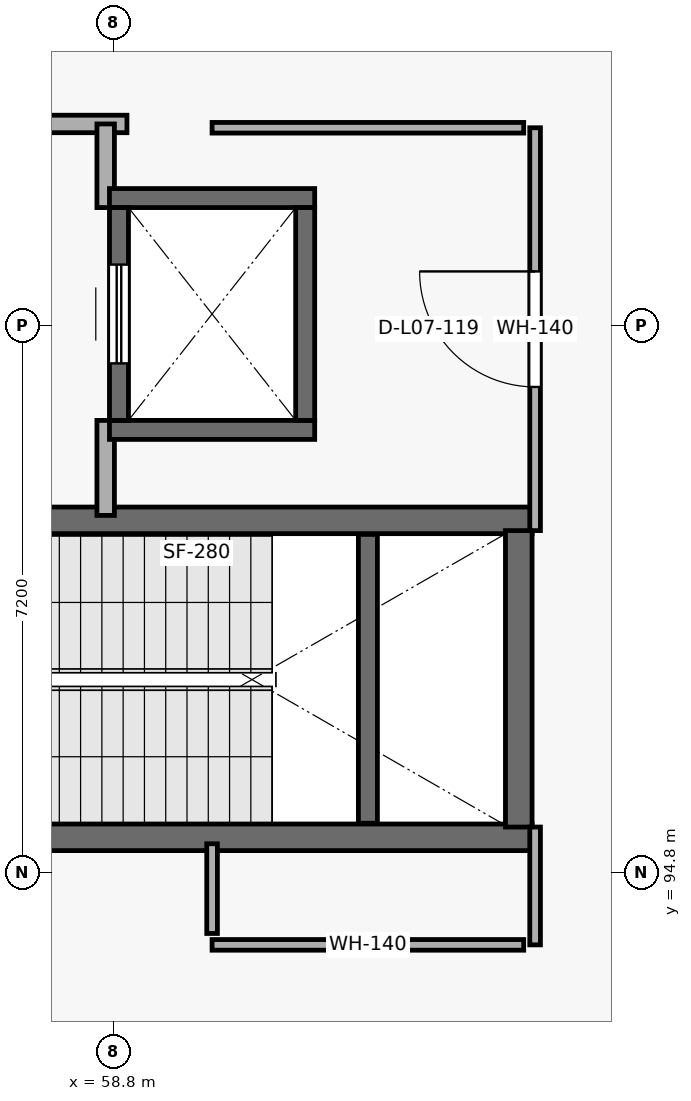
"""IFC4 building model, lengths in metres.
Left out: names, types, materials, properties, quantities, classifications, styles, units other than length and angle.
Written with IfcOpenShell. Run it as: python <this file> out.ifc"""

import sys

from ifc_helpers import new_model, si_unit, direction, frame, frame_2d, origin, place, context, subcontext, project, spatial, rectangle, extrude, element, fill, save


model = new_model("IFC4")
c1 = context("Model", 3, precision=1e-05, world=origin(), true_north=direction((0.0, 1.0)))
c2 = subcontext(c1, "Body", "Model", "MODEL_VIEW")
j1 = project(units=[si_unit("LENGTHUNIT", "METRE"), si_unit("PLANEANGLEUNIT", "RADIAN")], contexts=[c1])
p1 = place(None, origin())
s1 = spatial("IfcSite", under=j1, at=p1, CompositionType="ELEMENT")
p2 = place(p1, origin())
s2 = spatial("IfcBuilding", under=s1, at=p2, CompositionType="ELEMENT")
p3 = place(p2, frame((0.0, 0.0, 30.6)))
s3 = spatial("IfcBuildingStorey", under=s2, at=p3, CompositionType="ELEMENT", Elevation=30.6)
p4 = place(p3, frame((55.09, 95.265, 0.0), z_axis=(0.0, 0.0, 1.0), x_axis=(1.0, 0.0, 0.0)))
e1 = element("IfcWall", 1, at=p4, inside=s3, PredefinedType="SHEAR", context=c2, shape_type="SweptSolid", body=[
    extrude(rectangle(XDim=9.22, YDim=0.35, at=frame_2d((4.61, 0.0))), origin(), (0.0, 0.0, 1.0), 4.84),
])
p5 = place(p4, frame((0.45, 0.0, 0.0)))
e2 = element("IfcOpeningElement", 2, at=p5, cuts=e1, PredefinedType="OPENING", context=c2, shape_type="SweptSolid", body=[
    extrude(rectangle(XDim=1.25, YDim=2.2, at=frame_2d((0.625, 1.1))), frame((0.0, 0.185, 0.0), z_axis=(0.0, -1.0, 0.0), x_axis=(1.0, 0.0, 0.0)), (0.0, 0.0, 1.0), 0.37),
])
p6 = place(p3, frame((64.31, 99.435, 0.0), z_axis=(0.0, 0.0, 1.0), x_axis=(-1.0, 0.0, 0.0)))
e3 = element("IfcWall", 3, at=p6, inside=s3, PredefinedType="SHEAR", context=c2, shape_type="SweptSolid", body=[
    extrude(rectangle(XDim=9.22, YDim=0.35, at=frame_2d((4.61, 0.0))), origin(), (0.0, 0.0, 1.0), 4.84),
])
p7 = place(p6, frame((7.72, 0.0, 0.0)))
e4 = element("IfcOpeningElement", 4, at=p7, cuts=e3, PredefinedType="OPENING", context=c2, shape_type="SweptSolid", body=[
    extrude(rectangle(XDim=1.2, YDim=2.2, at=frame_2d((0.6, 1.1))), frame((0.0, 0.185, 0.0), z_axis=(0.0, -1.0, 0.0), x_axis=(1.0, 0.0, 0.0)), (0.0, 0.0, 1.0), 0.37),
])
p8 = place(p3, frame((64.135, 99.3, 0.0), z_axis=(0.0, 0.0, 1.0), x_axis=(0.0, -1.0, 0.0)))
e5 = element("IfcWall", 5, at=p8, inside=s3, PredefinedType="SHEAR", context=c2, shape_type="SweptSolid", body=[
    extrude(rectangle(XDim=3.9, YDim=0.35, at=frame_2d((1.95, 0.0))), origin(), (0.0, 0.0, 1.0), 4.84),
])
p9 = place(p3, frame((62.15, 95.45, 0.0), z_axis=(0.0, 0.0, 1.0), x_axis=(0.0, 1.0, 0.0)))
e6 = element("IfcWall", 6, at=p9, inside=s3, PredefinedType="SHEAR", context=c2, shape_type="SweptSolid", body=[
    extrude(rectangle(XDim=3.8, YDim=0.25, at=frame_2d((1.9, 0.0))), origin(), (0.0, 0.0, 1.0), 2.37),
])
p10 = place(p3, frame((55.09, 104.65, 0.0), z_axis=(0.0, 0.0, 1.0), x_axis=(1.0, 0.0, 0.0)))
e7 = element("IfcWall", 7, at=p10, inside=s3, PredefinedType="PARTITIONING", context=c2, shape_type="SweptSolid", body=[
    extrude(rectangle(XDim=3.89, YDim=0.23, at=frame_2d((1.945, 0.0))), origin(), (0.0, 0.0, 1.0), 4.84),
])
p11 = place(p10, frame((1.15, 0.0, 0.0)))
e8 = element("IfcOpeningElement", 8, at=p11, cuts=e7, PredefinedType="OPENING", context=c2, shape_type="SweptSolid", body=[
    extrude(rectangle(XDim=1.2, YDim=2.2, at=frame_2d((0.6, 1.1))), frame((0.0, 0.125, 0.0), z_axis=(0.0, -1.0, 0.0), x_axis=(1.0, 0.0, 0.0)), (0.0, 0.0, 1.0), 0.25),
])
p12 = place(p3, frame((58.7, 104.65, 0.0), z_axis=(0.0, 0.0, 1.0), x_axis=(0.0, -1.0, 0.0)))
e9 = element("IfcWall", 9, at=p12, inside=s3, PredefinedType="PARTITIONING", context=c2, shape_type="SweptSolid", body=[
    extrude(rectangle(XDim=1.1, YDim=0.23, at=frame_2d((0.55, 0.0))), origin(), (0.0, 0.0, 1.0), 4.84),
])
p13 = place(p3, frame((58.7, 100.75, 0.0), z_axis=(0.0, 0.0, 1.0), x_axis=(0.0, -1.0, 0.0)))
e10 = element("IfcWall", 10, at=p13, inside=s3, PredefinedType="PARTITIONING", context=c2, shape_type="SweptSolid", body=[
    extrude(rectangle(XDim=1.25, YDim=0.23, at=frame_2d((0.625, 0.0))), origin(), (0.0, 0.0, 1.0), 4.84),
])
for number, where, z_axis, x_axis in (
    (11, (58.75, 100.625, 0.0), (0.0, 0.0, 1.0), (1.0, 0.0, 0.0)),
    (12, (61.45, 103.675, 0.0), (0.0, 0.0, 1.0), (-1.0, 0.0, 0.0)),
):
    element("IfcWall", number, at=place(p3, frame(where, z_axis=z_axis, x_axis=x_axis)), inside=s3, PredefinedType="SHEAR", context=c2, shape_type="SweptSolid", body=[
        extrude(rectangle(XDim=2.7, YDim=0.25, at=frame_2d((1.35, 0.0))), origin(), (0.0, 0.0, 1.0), 4.84),
    ])
p14 = place(p3, frame((58.875, 100.75, 0.0), z_axis=(0.0, 0.0, 1.0), x_axis=(0.0, 1.0, 0.0)))
e13 = element("IfcWall", 13, at=p14, inside=s3, PredefinedType="SHEAR", context=c2, shape_type="SweptSolid", body=[
    extrude(rectangle(XDim=2.8, YDim=0.25, at=frame_2d((1.4, 0.0))), origin(), (0.0, 0.0, 1.0), 4.84),
])
p15 = place(p14, frame((0.75, 0.0, 0.0)))
e14 = element("IfcOpeningElement", 14, at=p15, cuts=e13, PredefinedType="OPENING", context=c2, shape_type="SweptSolid", body=[
    extrude(rectangle(XDim=1.3, YDim=2.25, at=frame_2d((0.65, 1.125))), frame((0.0, 0.135, 0.0), z_axis=(0.0, -1.0, 0.0), x_axis=(1.0, 0.0, 0.0)), (0.0, 0.0, 1.0), 0.27),
])
p16 = place(p3, frame((61.325, 103.55, 0.0), z_axis=(0.0, 0.0, 1.0), x_axis=(0.0, -1.0, 0.0)))
e15 = element("IfcWall", 15, at=p16, inside=s3, PredefinedType="SHEAR", context=c2, shape_type="SweptSolid", body=[
    extrude(rectangle(XDim=2.8, YDim=0.25, at=frame_2d((1.4, 0.0))), origin(), (0.0, 0.0, 1.0), 4.84),
])
p17 = place(p3, frame((64.35, 104.6, 0.0), z_axis=(0.0, 0.0, 1.0), x_axis=(0.0, -1.0, 0.0)))
e16 = element("IfcWall", 16, at=p17, inside=s3, PredefinedType="PARTITIONING", context=c2, shape_type="SweptSolid", body=[
    extrude(rectangle(XDim=5.3, YDim=0.14, at=frame_2d((2.65, 0.0))), origin(), (0.0, 0.0, 1.0), 4.84),
])
p18 = place(p17, frame((1.89, 0.0, 0.0)))
e17 = element("IfcOpeningElement", 17, at=p18, cuts=e16, PredefinedType="OPENING", context=c2, shape_type="SweptSolid", body=[
    extrude(rectangle(XDim=1.52, YDim=2.4, at=frame_2d((0.76, 1.2))), frame((0.0, 0.08, 0.0), z_axis=(0.0, -1.0, 0.0), x_axis=(1.0, 0.0, 0.0)), (0.0, 0.0, 1.0), 0.16),
])
p19 = place(p3, frame((64.35, 95.4, 0.0), z_axis=(0.0, 0.0, 1.0), x_axis=(0.0, -1.0, 0.0)))
e18 = element("IfcWall", 18, at=p19, inside=s3, PredefinedType="PARTITIONING", context=c2, shape_type="SweptSolid", body=[
    extrude(rectangle(XDim=1.55, YDim=0.14, at=frame_2d((0.775, 0.0))), origin(), (0.0, 0.0, 1.0), 4.84),
])
for number, where, z_axis, x_axis in (
    (19, (60.1, 104.6, 0.0), (0.0, 0.0, 1.0), (1.0, 0.0, 0.0)),
    (20, (64.2, 93.85, 0.0), (0.0, 0.0, 1.0), (-1.0, 0.0, 0.0)),
):
    element("IfcWall", number, at=place(p3, frame(where, z_axis=z_axis, x_axis=x_axis)), inside=s3, PredefinedType="PARTITIONING", context=c2, shape_type="SweptSolid", body=[
        extrude(rectangle(XDim=4.1, YDim=0.14, at=frame_2d((2.05, 0.0))), origin(), (0.0, 0.0, 1.0), 4.84),
    ])
p20 = place(p3, frame((60.1, 94.0, 0.0), z_axis=(0.0, 0.0, 1.0), x_axis=(0.0, 1.0, 0.0)))
e21 = element("IfcWall", 21, at=p20, inside=s3, PredefinedType="PARTITIONING", context=c2, shape_type="SweptSolid", body=[
    extrude(rectangle(XDim=1.18, YDim=0.14, at=frame_2d((0.59, 0.0))), origin(), (0.0, 0.0, 1.0), 4.84),
])
p21 = place(p15, origin())
e22 = element("IfcDoor", 22, at=p21, inside=s3, OperationType="SLIDING_TO_RIGHT", PredefinedType="DOOR", context=c2, shape_type="SweptSolid", body=[
    extrude(rectangle(XDim=1.3, YDim=2.25, at=frame_2d((0.65, 1.125))), frame((0.0, 0.025, 0.0), z_axis=(0.0, -1.0, 0.0), x_axis=(1.0, 0.0, 0.0)), (0.0, 0.0, 1.0), 0.05),
])
fill(e14, e22)
p22 = place(p18, origin())
e23 = element("IfcDoor", 23, at=p22, inside=s3, OperationType="SINGLE_SWING_RIGHT", PredefinedType="DOOR", context=c2, shape_type="SweptSolid", body=[
    extrude(rectangle(XDim=1.52, YDim=2.4, at=frame_2d((0.76, 1.2))), frame((0.0, 0.025, 0.0), z_axis=(0.0, -1.0, 0.0), x_axis=(1.0, 0.0, 0.0)), (0.0, 0.0, 1.0), 0.05),
])
fill(e17, e23)
save(model, sys.argv[1])
